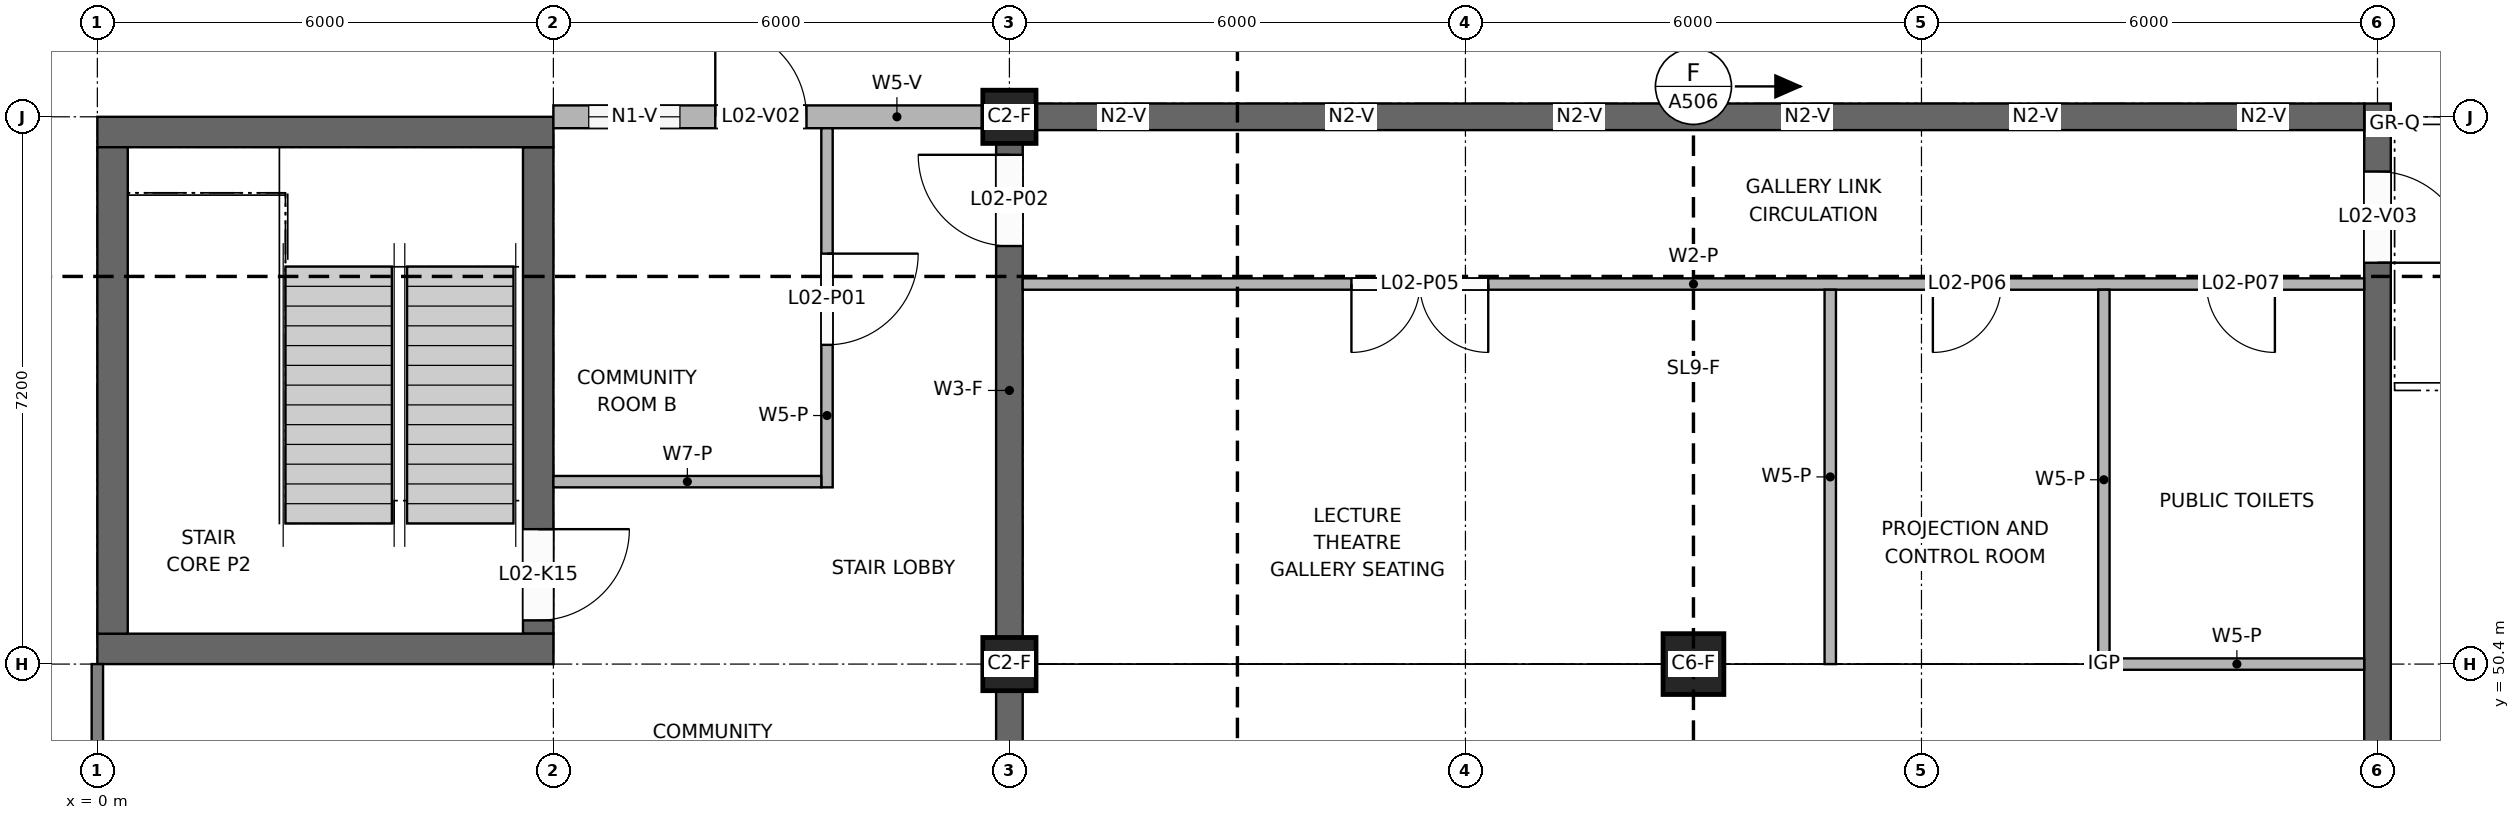
"""IFC4 building model, lengths in metres.
Left out: names, types, materials, properties, quantities, classifications, styles, units other than length and angle.
Written with IfcOpenShell. Run it as: python <this file> out.ifc"""

import sys

from ifc_helpers import new_model, si_unit, direction, frame, frame_2d, origin, origin_2d, place, context, subcontext, project, spatial, rectangle, extrude, element, fill, save


model = new_model("IFC4")
c1 = context("Model", 3, precision=1e-05, world=origin(), true_north=direction((0.0, 1.0)))
c2 = subcontext(c1, "Body", "Model", "MODEL_VIEW")
j1 = project(units=[si_unit("LENGTHUNIT", "METRE"), si_unit("PLANEANGLEUNIT", "RADIAN")], contexts=[c1])
p1 = place(None, origin())
s1 = spatial("IfcSite", under=j1, at=p1, CompositionType="ELEMENT")
p2 = place(p1, origin())
s2 = spatial("IfcBuilding", under=s1, at=p2, CompositionType="ELEMENT")
p3 = place(p2, frame((0.0, 0.0, 8.4)))
s3 = spatial("IfcBuildingStorey", under=s2, at=p3, CompositionType="ELEMENT", Elevation=8.4)
for number, where, z_axis, x_axis in (
    (1, (0.0, 50.6, 0.0), (0.0, 0.0, 1.0), (1.0, 0.0, 0.0)),
    (2, (0.0, 57.4, 0.0), (0.0, 0.0, 1.0), (1.0, 0.0, 0.0)),
):
    element("IfcWall", number, at=place(p3, frame(where, z_axis=z_axis, x_axis=x_axis)), inside=s3, PredefinedType="SHEAR", context=c2, shape_type="SweptSolid", body=[
        extrude(rectangle(XDim=6.0, YDim=0.4, at=frame_2d((3.0, 0.0))), origin(), (0.0, 0.0, 1.0), 4.0),
    ])
p4 = place(p3, frame((0.2, 50.8, 0.0), z_axis=(0.0, 0.0, 1.0), x_axis=(0.0, 1.0, 0.0)))
e3 = element("IfcWall", 3, at=p4, inside=s3, PredefinedType="SHEAR", context=c2, shape_type="SweptSolid", body=[
    extrude(rectangle(XDim=6.4, YDim=0.4, at=frame_2d((3.2, 0.0))), origin(), (0.0, 0.0, 1.0), 4.0),
])
p5 = place(p3, frame((5.8, 50.8, 0.0), z_axis=(0.0, 0.0, 1.0), x_axis=(0.0, 1.0, 0.0)))
e4 = element("IfcWall", 4, at=p5, inside=s3, PredefinedType="SHEAR", context=c2, shape_type="SweptSolid", body=[
    extrude(rectangle(XDim=6.4, YDim=0.4, at=frame_2d((3.2, 0.0))), origin(), (0.0, 0.0, 1.0), 4.0),
])
p6 = place(p5, frame((0.175, 0.0, 0.0)))
e5 = element("IfcOpeningElement", 5, at=p6, cuts=e4, PredefinedType="OPENING", context=c2, shape_type="SweptSolid", body=[
    extrude(rectangle(XDim=1.2, YDim=2.1, at=frame_2d((0.6, 1.05))), frame((0.0, 0.21, 0.0), z_axis=(0.0, -1.0, 0.0), x_axis=(1.0, 0.0, 0.0)), (0.0, 0.0, 1.0), 0.42),
])
for number, where, z_axis, x_axis in (
    (6, (12.0, 50.4, 0.0), (0.0, 0.0, 1.0), (1.0, 0.0, 0.0)),
    (7, (12.0, 57.6, 0.0), (0.0, 0.0, 1.0), (1.0, 0.0, 0.0)),
):
    element("IfcColumn", number, at=place(p3, frame(where, z_axis=z_axis, x_axis=x_axis)), inside=s3, PredefinedType="COLUMN", context=c2, shape_type="SweptSolid", body=[
        extrude(rectangle(XDim=0.7, YDim=0.7, at=origin_2d()), origin(), (0.0, 0.0, 1.0), 4.0),
    ])
p7 = place(p3, frame((30.0, 35.825, 0.0), z_axis=(0.0, 0.0, 1.0), x_axis=(0.0, 1.0, 0.0)))
e8 = element("IfcWall", 8, at=p7, inside=s3, PredefinedType="SHEAR", context=c2, shape_type="SweptSolid", body=[
    extrude(rectangle(XDim=21.95, YDim=0.35, at=frame_2d((10.975, 0.0))), origin(), (0.0, 0.0, 1.0), 4.2),
])
p8 = place(p7, frame((19.855, 0.0, 0.0)))
e9 = element("IfcOpeningElement", 9, at=p8, cuts=e8, PredefinedType="OPENING", context=c2, shape_type="SweptSolid", body=[
    extrude(rectangle(XDim=1.2, YDim=2.4, at=frame_2d((0.6, 1.2))), frame((0.0, 0.185, 0.0), z_axis=(0.0, -1.0, 0.0), x_axis=(1.0, 0.0, 0.0)), (0.0, 0.0, 1.0), 0.37),
])
p9 = place(p3, frame((12.0, 43.55, 0.0), z_axis=(0.0, 0.0, 1.0), x_axis=(0.0, 1.0, 0.0)))
e10 = element("IfcWall", 10, at=p9, inside=s3, PredefinedType="SHEAR", context=c2, shape_type="SweptSolid", body=[
    extrude(rectangle(XDim=6.5, YDim=0.35, at=frame_2d((3.25, 0.0))), origin(), (0.0, 0.0, 1.0), 3.1),
])
p10 = place(p3, frame((12.0, 50.75, 0.0), z_axis=(0.0, 0.0, 1.0), x_axis=(0.0, 1.0, 0.0)))
e11 = element("IfcWall", 11, at=p10, inside=s3, PredefinedType="SHEAR", context=c2, shape_type="SweptSolid", body=[
    extrude(rectangle(XDim=6.5, YDim=0.35, at=frame_2d((3.25, 0.0))), origin(), (0.0, 0.0, 1.0), 3.1),
])
p11 = place(p10, frame((5.15, 0.0, 0.0)))
e12 = element("IfcOpeningElement", 12, at=p11, cuts=e11, PredefinedType="OPENING", context=c2, shape_type="SweptSolid", body=[
    extrude(rectangle(XDim=1.2, YDim=2.1, at=frame_2d((0.6, 1.05))), frame((0.0, 0.185, 0.0), z_axis=(0.0, -1.0, 0.0), x_axis=(1.0, 0.0, 0.0)), (0.0, 0.0, 1.0), 0.37),
])
p12 = place(p3, frame((12.35, 57.6, 0.0), z_axis=(0.0, 0.0, 1.0), x_axis=(1.0, 0.0, 0.0)))
e13 = element("IfcWall", 13, at=p12, inside=s3, PredefinedType="SHEAR", context=c2, shape_type="SweptSolid", body=[
    extrude(rectangle(XDim=17.475, YDim=0.35, at=frame_2d((8.737, 0.0))), origin(), (0.0, 0.0, 1.0), 4.2),
])
p13 = place(p12, frame((0.85, 0.0, 1.2)))
e14 = element("IfcOpeningElement", 14, at=p13, cuts=e13, PredefinedType="OPENING", context=c2, shape_type="SweptSolid", body=[
    extrude(rectangle(XDim=0.6, YDim=2.4, at=frame_2d((0.3, 1.2))), frame((0.0, 0.185, 0.0), z_axis=(0.0, -1.0, 0.0), x_axis=(1.0, 0.0, 0.0)), (0.0, 0.0, 1.0), 0.37),
])
p14 = place(p12, frame((3.85, 0.0, 1.2)))
e15 = element("IfcOpeningElement", 15, at=p14, cuts=e13, PredefinedType="OPENING", context=c2, shape_type="SweptSolid", body=[
    extrude(rectangle(XDim=0.6, YDim=2.4, at=frame_2d((0.3, 1.2))), frame((0.0, 0.185, 0.0), z_axis=(0.0, -1.0, 0.0), x_axis=(1.0, 0.0, 0.0)), (0.0, 0.0, 1.0), 0.37),
])
p15 = place(p12, frame((6.85, 0.0, 1.2)))
e16 = element("IfcOpeningElement", 16, at=p15, cuts=e13, PredefinedType="OPENING", context=c2, shape_type="SweptSolid", body=[
    extrude(rectangle(XDim=0.6, YDim=2.4, at=frame_2d((0.3, 1.2))), frame((0.0, 0.185, 0.0), z_axis=(0.0, -1.0, 0.0), x_axis=(1.0, 0.0, 0.0)), (0.0, 0.0, 1.0), 0.37),
])
p16 = place(p12, frame((9.85, 0.0, 1.2)))
e17 = element("IfcOpeningElement", 17, at=p16, cuts=e13, PredefinedType="OPENING", context=c2, shape_type="SweptSolid", body=[
    extrude(rectangle(XDim=0.6, YDim=2.4, at=frame_2d((0.3, 1.2))), frame((0.0, 0.185, 0.0), z_axis=(0.0, -1.0, 0.0), x_axis=(1.0, 0.0, 0.0)), (0.0, 0.0, 1.0), 0.37),
])
p17 = place(p12, frame((12.85, 0.0, 1.2)))
e18 = element("IfcOpeningElement", 18, at=p17, cuts=e13, PredefinedType="OPENING", context=c2, shape_type="SweptSolid", body=[
    extrude(rectangle(XDim=0.6, YDim=2.4, at=frame_2d((0.3, 1.2))), frame((0.0, 0.185, 0.0), z_axis=(0.0, -1.0, 0.0), x_axis=(1.0, 0.0, 0.0)), (0.0, 0.0, 1.0), 0.37),
])
p18 = place(p12, frame((15.85, 0.0, 1.2)))
e19 = element("IfcOpeningElement", 19, at=p18, cuts=e13, PredefinedType="OPENING", context=c2, shape_type="SweptSolid", body=[
    extrude(rectangle(XDim=0.6, YDim=2.4, at=frame_2d((0.3, 1.2))), frame((0.0, 0.185, 0.0), z_axis=(0.0, -1.0, 0.0), x_axis=(1.0, 0.0, 0.0)), (0.0, 0.0, 1.0), 0.37),
])
p19 = place(p3, frame((21.0, 50.4, 0.0), z_axis=(0.0, 0.0, 1.0), x_axis=(1.0, 0.0, 0.0)))
e20 = element("IfcColumn", 20, at=p19, inside=s3, PredefinedType="COLUMN", context=c2, shape_type="SweptSolid", body=[
    extrude(rectangle(XDim=0.8, YDim=0.8, at=origin_2d()), origin(), (0.0, 0.0, 1.0), 4.0),
])
p20 = place(p3, frame((6.0, 57.6, 0.0), z_axis=(0.0, 0.0, 1.0), x_axis=(1.0, 0.0, 0.0)))
e21 = element("IfcWall", 21, at=p20, inside=s3, PredefinedType="SOLIDWALL", context=c2, shape_type="SweptSolid", body=[
    extrude(rectangle(XDim=5.65, YDim=0.3, at=frame_2d((2.825, 0.0))), origin(), (0.0, 0.0, 1.0), 3.2),
])
p21 = place(p20, frame((2.13, 0.0, 0.0)))
e22 = element("IfcOpeningElement", 22, at=p21, cuts=e21, PredefinedType="OPENING", context=c2, shape_type="SweptSolid", body=[
    extrude(rectangle(XDim=1.2, YDim=2.4, at=frame_2d((0.6, 1.2))), frame((0.0, 0.16, 0.0), z_axis=(0.0, -1.0, 0.0), x_axis=(1.0, 0.0, 0.0)), (0.0, 0.0, 1.0), 0.32),
])
p22 = place(p20, frame((0.465, 0.0, 0.9)))
e23 = element("IfcOpeningElement", 23, at=p22, cuts=e21, PredefinedType="OPENING", context=c2, shape_type="SweptSolid", body=[
    extrude(rectangle(XDim=1.2, YDim=1.5, at=frame_2d((0.6, 0.75))), frame((0.0, 0.16, 0.0), z_axis=(0.0, -1.0, 0.0), x_axis=(1.0, 0.0, 0.0)), (0.0, 0.0, 1.0), 0.32),
])
p23 = place(p3, frame((9.6, 52.725, 0.0), z_axis=(0.0, 0.0, 1.0), x_axis=(0.0, 1.0, 0.0)))
e24 = element("IfcWall", 24, at=p23, inside=s3, PredefinedType="PARTITIONING", context=c2, shape_type="SweptSolid", body=[
    extrude(rectangle(XDim=4.725, YDim=0.15, at=frame_2d((2.362, 0.0))), origin(), (0.0, 0.0, 1.0), 3.2),
])
p24 = place(p23, frame((1.875, 0.0, 0.0)))
e25 = element("IfcOpeningElement", 25, at=p24, cuts=e24, PredefinedType="OPENING", context=c2, shape_type="SweptSolid", body=[
    extrude(rectangle(XDim=1.2, YDim=2.1, at=frame_2d((0.6, 1.05))), frame((0.0, 0.085, 0.0), z_axis=(0.0, -1.0, 0.0), x_axis=(1.0, 0.0, 0.0)), (0.0, 0.0, 1.0), 0.17),
])
p25 = place(p3, frame((22.8, 50.4, 0.0), z_axis=(0.0, 0.0, 1.0), x_axis=(0.0, 1.0, 0.0)))
e26 = element("IfcWall", 26, at=p25, inside=s3, PredefinedType="PARTITIONING", context=c2, shape_type="SweptSolid", body=[
    extrude(rectangle(XDim=4.925, YDim=0.15, at=frame_2d((2.462, 0.0))), origin(), (0.0, 0.0, 1.0), 3.2),
])
p26 = place(p3, frame((26.4, 50.325, 0.0), z_axis=(0.0, 0.0, 1.0), x_axis=(0.0, 1.0, 0.0)))
e27 = element("IfcWall", 27, at=p26, inside=s3, PredefinedType="PARTITIONING", context=c2, shape_type="SweptSolid", body=[
    extrude(rectangle(XDim=5.0, YDim=0.15, at=frame_2d((2.5, 0.0))), origin(), (0.0, 0.0, 1.0), 3.2),
])
p27 = place(p3, frame((26.475, 50.4, 0.0), z_axis=(0.0, 0.0, 1.0), x_axis=(1.0, 0.0, 0.0)))
e28 = element("IfcWall", 28, at=p27, inside=s3, PredefinedType="PARTITIONING", context=c2, shape_type="SweptSolid", body=[
    extrude(rectangle(XDim=3.35, YDim=0.15, at=frame_2d((1.675, 0.0))), origin(), (0.0, 0.0, 1.0), 3.2),
])
p28 = place(p3, frame((6.0, 52.8, 0.0), z_axis=(0.0, 0.0, 1.0), x_axis=(1.0, 0.0, 0.0)))
e29 = element("IfcWall", 29, at=p28, inside=s3, PredefinedType="PARTITIONING", context=c2, shape_type="SweptSolid", body=[
    extrude(rectangle(XDim=3.525, YDim=0.15, at=frame_2d((1.762, 0.0))), origin(), (0.0, 0.0, 1.0), 4.0),
])
p29 = place(p3, frame((12.175, 55.4, 0.0), z_axis=(0.0, 0.0, 1.0), x_axis=(1.0, 0.0, 0.0)))
e30 = element("IfcWall", 30, at=p29, inside=s3, PredefinedType="PARTITIONING", context=c2, shape_type="SweptSolid", body=[
    extrude(rectangle(XDim=17.65, YDim=0.15, at=frame_2d((8.825, 0.0))), origin(), (0.0, 0.0, 1.0), 3.1),
])
p30 = place(p29, frame((4.325, 0.0, 0.0)))
e31 = element("IfcOpeningElement", 31, at=p30, cuts=e30, PredefinedType="OPENING", context=c2, shape_type="SweptSolid", body=[
    extrude(rectangle(XDim=1.8, YDim=2.1, at=frame_2d((0.9, 1.05))), frame((0.0, 0.085, 0.0), z_axis=(0.0, -1.0, 0.0), x_axis=(1.0, 0.0, 0.0)), (0.0, 0.0, 1.0), 0.17),
])
p31 = place(p29, frame((11.975, 0.0, 0.0)))
e32 = element("IfcOpeningElement", 32, at=p31, cuts=e30, PredefinedType="OPENING", context=c2, shape_type="SweptSolid", body=[
    extrude(rectangle(XDim=0.9, YDim=2.1, at=frame_2d((0.45, 1.05))), frame((0.0, 0.085, 0.0), z_axis=(0.0, -1.0, 0.0), x_axis=(1.0, 0.0, 0.0)), (0.0, 0.0, 1.0), 0.17),
])
p32 = place(p29, frame((15.575, 0.0, 0.0)))
e33 = element("IfcOpeningElement", 33, at=p32, cuts=e30, PredefinedType="OPENING", context=c2, shape_type="SweptSolid", body=[
    extrude(rectangle(XDim=0.9, YDim=2.1, at=frame_2d((0.45, 1.05))), frame((0.0, 0.085, 0.0), z_axis=(0.0, -1.0, 0.0), x_axis=(1.0, 0.0, 0.0)), (0.0, 0.0, 1.0), 0.17),
])
p33 = place(p21, origin())
e34 = element("IfcDoor", 34, at=p33, inside=s3, OperationType="SINGLE_SWING_LEFT", PredefinedType="DOOR", context=c2, shape_type="SweptSolid", body=[
    extrude(rectangle(XDim=1.2, YDim=2.4, at=frame_2d((0.6, 1.2))), frame((0.0, 0.025, 0.0), z_axis=(0.0, -1.0, 0.0), x_axis=(1.0, 0.0, 0.0)), (0.0, 0.0, 1.0), 0.05),
])
fill(e22, e34)
p34 = place(p22, origin())
e35 = element("IfcWindow", 35, at=p34, inside=s3, PartitioningType="SINGLE_PANEL", PredefinedType="WINDOW", context=c2, shape_type="SweptSolid", body=[
    extrude(rectangle(XDim=1.2, YDim=1.5, at=frame_2d((0.6, 0.75))), frame((0.0, 0.03, 0.0), z_axis=(0.0, -1.0, 0.0), x_axis=(1.0, 0.0, 0.0)), (0.0, 0.0, 1.0), 0.06),
])
fill(e23, e35)
p35 = place(p8, frame((1.2, 0.0, 0.0), z_axis=(0.0, 0.0, 1.0), x_axis=(-1.0, 0.0, 0.0)))
e36 = element("IfcDoor", 36, at=p35, inside=s3, OperationType="SINGLE_SWING_RIGHT", PredefinedType="DOOR", context=c2, shape_type="SweptSolid", body=[
    extrude(rectangle(XDim=1.2, YDim=2.4, at=frame_2d((0.6, 1.2))), frame((0.0, 0.025, 0.0), z_axis=(0.0, -1.0, 0.0), x_axis=(1.0, 0.0, 0.0)), (0.0, 0.0, 1.0), 0.05),
])
fill(e9, e36)
p36 = place(p13, origin())
e37 = element("IfcWindow", 37, at=p36, inside=s3, PartitioningType="SINGLE_PANEL", PredefinedType="WINDOW", context=c2, shape_type="SweptSolid", body=[
    extrude(rectangle(XDim=0.6, YDim=2.4, at=frame_2d((0.3, 1.2))), frame((0.0, 0.03, 0.0), z_axis=(0.0, -1.0, 0.0), x_axis=(1.0, 0.0, 0.0)), (0.0, 0.0, 1.0), 0.06),
])
fill(e14, e37)
p37 = place(p14, origin())
e38 = element("IfcWindow", 38, at=p37, inside=s3, PartitioningType="SINGLE_PANEL", PredefinedType="WINDOW", context=c2, shape_type="SweptSolid", body=[
    extrude(rectangle(XDim=0.6, YDim=2.4, at=frame_2d((0.3, 1.2))), frame((0.0, 0.03, 0.0), z_axis=(0.0, -1.0, 0.0), x_axis=(1.0, 0.0, 0.0)), (0.0, 0.0, 1.0), 0.06),
])
fill(e15, e38)
p38 = place(p15, origin())
e39 = element("IfcWindow", 39, at=p38, inside=s3, PartitioningType="SINGLE_PANEL", PredefinedType="WINDOW", context=c2, shape_type="SweptSolid", body=[
    extrude(rectangle(XDim=0.6, YDim=2.4, at=frame_2d((0.3, 1.2))), frame((0.0, 0.03, 0.0), z_axis=(0.0, -1.0, 0.0), x_axis=(1.0, 0.0, 0.0)), (0.0, 0.0, 1.0), 0.06),
])
fill(e16, e39)
p39 = place(p16, origin())
e40 = element("IfcWindow", 40, at=p39, inside=s3, PartitioningType="SINGLE_PANEL", PredefinedType="WINDOW", context=c2, shape_type="SweptSolid", body=[
    extrude(rectangle(XDim=0.6, YDim=2.4, at=frame_2d((0.3, 1.2))), frame((0.0, 0.03, 0.0), z_axis=(0.0, -1.0, 0.0), x_axis=(1.0, 0.0, 0.0)), (0.0, 0.0, 1.0), 0.06),
])
fill(e17, e40)
p40 = place(p17, origin())
e41 = element("IfcWindow", 41, at=p40, inside=s3, PartitioningType="SINGLE_PANEL", PredefinedType="WINDOW", context=c2, shape_type="SweptSolid", body=[
    extrude(rectangle(XDim=0.6, YDim=2.4, at=frame_2d((0.3, 1.2))), frame((0.0, 0.03, 0.0), z_axis=(0.0, -1.0, 0.0), x_axis=(1.0, 0.0, 0.0)), (0.0, 0.0, 1.0), 0.06),
])
fill(e18, e41)
p41 = place(p18, origin())
e42 = element("IfcWindow", 42, at=p41, inside=s3, PartitioningType="SINGLE_PANEL", PredefinedType="WINDOW", context=c2, shape_type="SweptSolid", body=[
    extrude(rectangle(XDim=0.6, YDim=2.4, at=frame_2d((0.3, 1.2))), frame((0.0, 0.03, 0.0), z_axis=(0.0, -1.0, 0.0), x_axis=(1.0, 0.0, 0.0)), (0.0, 0.0, 1.0), 0.06),
])
fill(e19, e42)
p42 = place(p6, frame((1.2, 0.0, 0.0), z_axis=(0.0, 0.0, 1.0), x_axis=(-1.0, 0.0, 0.0)))
e43 = element("IfcDoor", 43, at=p42, inside=s3, OperationType="SINGLE_SWING_LEFT", PredefinedType="DOOR", context=c2, shape_type="SweptSolid", body=[
    extrude(rectangle(XDim=1.2, YDim=2.1, at=frame_2d((0.6, 1.05))), frame((0.0, 0.025, 0.0), z_axis=(0.0, -1.0, 0.0), x_axis=(1.0, 0.0, 0.0)), (0.0, 0.0, 1.0), 0.05),
])
fill(e5, e43)
p43 = place(p24, frame((1.2, 0.0, 0.0), z_axis=(0.0, 0.0, 1.0), x_axis=(-1.0, 0.0, 0.0)))
e44 = element("IfcDoor", 44, at=p43, inside=s3, OperationType="SINGLE_SWING_LEFT", PredefinedType="DOOR", context=c2, shape_type="SweptSolid", body=[
    extrude(rectangle(XDim=1.2, YDim=2.1, at=frame_2d((0.6, 1.05))), frame((0.0, 0.025, 0.0), z_axis=(0.0, -1.0, 0.0), x_axis=(1.0, 0.0, 0.0)), (0.0, 0.0, 1.0), 0.05),
])
fill(e25, e44)
p44 = place(p11, origin())
e45 = element("IfcDoor", 45, at=p44, inside=s3, OperationType="SINGLE_SWING_RIGHT", PredefinedType="DOOR", context=c2, shape_type="SweptSolid", body=[
    extrude(rectangle(XDim=1.2, YDim=2.1, at=frame_2d((0.6, 1.05))), frame((0.0, 0.025, 0.0), z_axis=(0.0, -1.0, 0.0), x_axis=(1.0, 0.0, 0.0)), (0.0, 0.0, 1.0), 0.05),
])
fill(e12, e45)
p45 = place(p30, frame((1.8, 0.0, 0.0), z_axis=(0.0, 0.0, 1.0), x_axis=(-1.0, 0.0, 0.0)))
e46 = element("IfcDoor", 46, at=p45, inside=s3, OperationType="DOUBLE_DOOR_SINGLE_SWING", PredefinedType="DOOR", context=c2, shape_type="SweptSolid", body=[
    extrude(rectangle(XDim=1.8, YDim=2.1, at=frame_2d((0.9, 1.05))), frame((0.0, 0.025, 0.0), z_axis=(0.0, -1.0, 0.0), x_axis=(1.0, 0.0, 0.0)), (0.0, 0.0, 1.0), 0.05),
])
fill(e31, e46)
p46 = place(p31, frame((0.9, 0.0, 0.0), z_axis=(0.0, 0.0, 1.0), x_axis=(-1.0, 0.0, 0.0)))
e47 = element("IfcDoor", 47, at=p46, inside=s3, OperationType="SINGLE_SWING_RIGHT", PredefinedType="DOOR", context=c2, shape_type="SweptSolid", body=[
    extrude(rectangle(XDim=0.9, YDim=2.1, at=frame_2d((0.45, 1.05))), frame((0.0, 0.025, 0.0), z_axis=(0.0, -1.0, 0.0), x_axis=(1.0, 0.0, 0.0)), (0.0, 0.0, 1.0), 0.05),
])
fill(e32, e47)
p47 = place(p32, frame((0.9, 0.0, 0.0), z_axis=(0.0, 0.0, 1.0), x_axis=(-1.0, 0.0, 0.0)))
e48 = element("IfcDoor", 48, at=p47, inside=s3, OperationType="SINGLE_SWING_LEFT", PredefinedType="DOOR", context=c2, shape_type="SweptSolid", body=[
    extrude(rectangle(XDim=0.9, YDim=2.1, at=frame_2d((0.45, 1.05))), frame((0.0, 0.025, 0.0), z_axis=(0.0, -1.0, 0.0), x_axis=(1.0, 0.0, 0.0)), (0.0, 0.0, 1.0), 0.05),
])
fill(e33, e48)
save(model, sys.argv[1])
